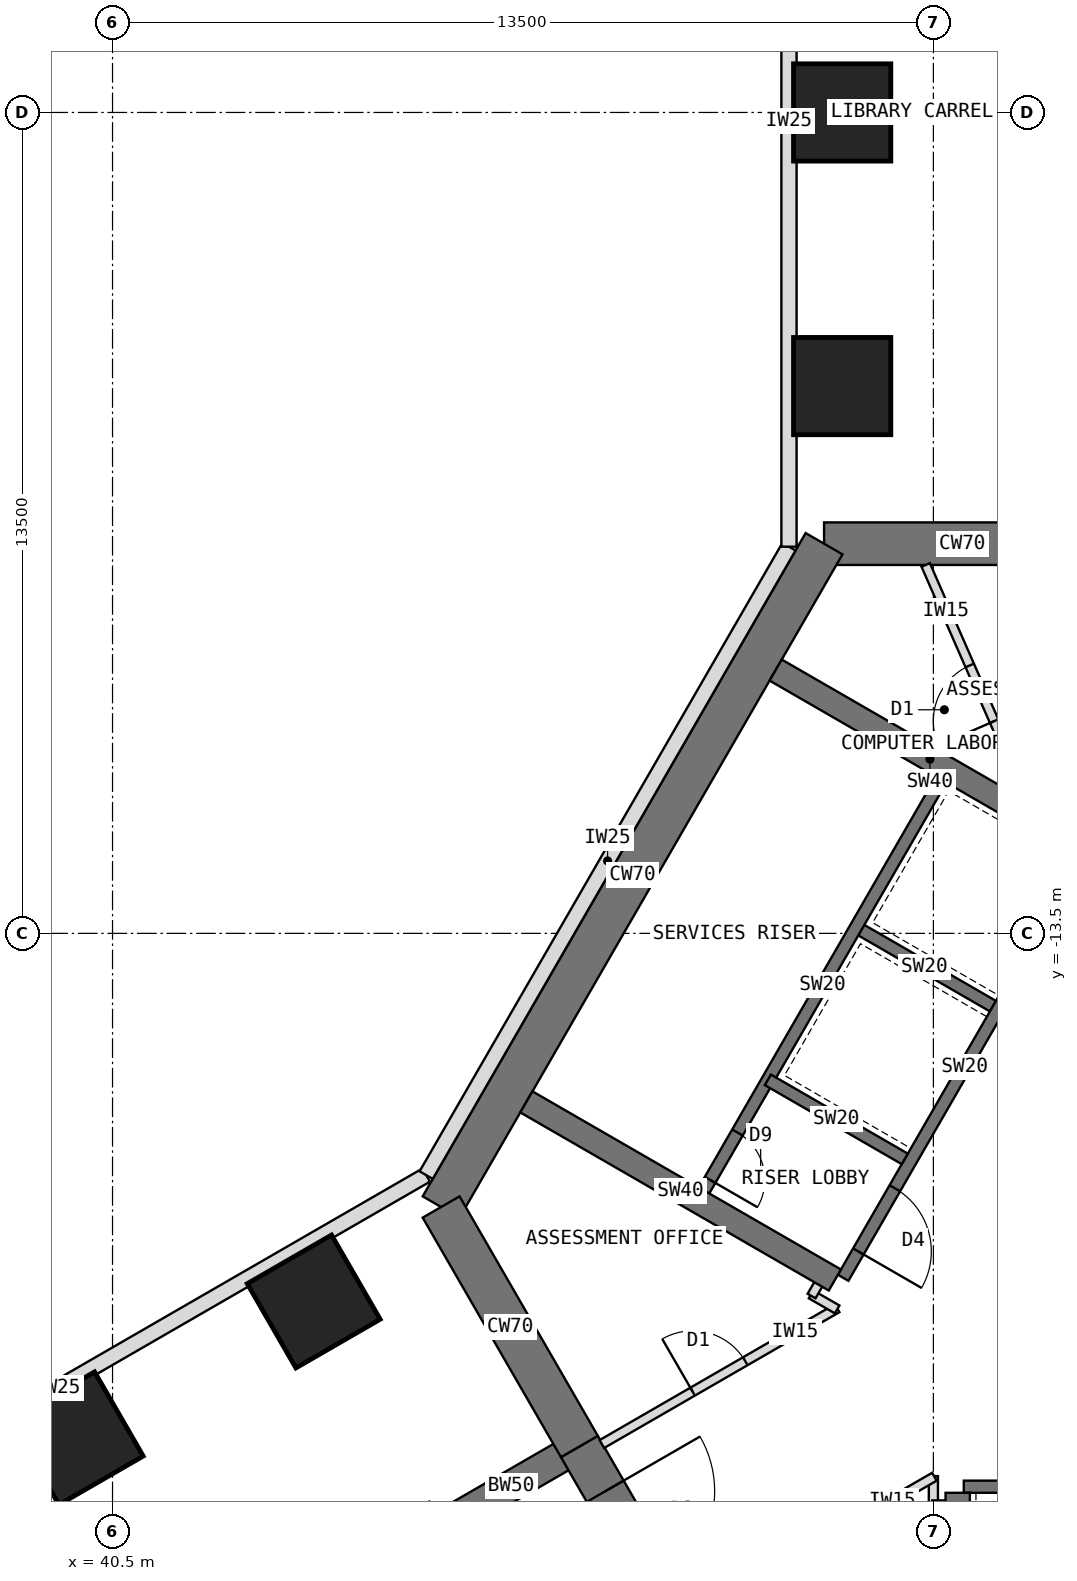
"""IFC4 building model, lengths in metres.
Left out: names, types, materials, properties, quantities, classifications, styles, units other than length and angle.
Written with IfcOpenShell. Run it as: python <this file> out.ifc"""

import sys

from ifc_helpers import new_model, si_unit, direction, frame, frame_2d, origin, origin_2d, place, context, subcontext, project, spatial, rectangle, extrude, element, fill, save


model = new_model("IFC4")
c1 = context("Model", 3, precision=1e-05, world=origin(), true_north=direction((0.0, 1.0)))
c2 = subcontext(c1, "Body", "Model", "MODEL_VIEW")
j1 = project(units=[si_unit("LENGTHUNIT", "METRE"), si_unit("PLANEANGLEUNIT", "RADIAN")], contexts=[c1])
p1 = place(None, origin())
s1 = spatial("IfcSite", under=j1, at=p1, CompositionType="ELEMENT")
p2 = place(p1, origin())
s2 = spatial("IfcBuilding", under=s1, at=p2, CompositionType="ELEMENT")
p3 = place(p2, frame((0.0, 0.0, 10.5)))
s3 = spatial("IfcBuildingStorey", under=s2, at=p3, CompositionType="ELEMENT", Elevation=10.5)
for number, where, z_axis, x_axis in (
    (1, (40.5, -13.5, 0.0), (0.0, 0.0, 1.0), (1.0, 0.0, 0.0)),
    (2, (40.5, 0.0, 0.0), (0.0, 0.0, 1.0), (1.0, 0.0, 0.0)),
):
    element("IfcColumn", number, at=place(p3, frame(where, z_axis=z_axis, x_axis=x_axis)), inside=s3, PredefinedType="COLUMN", context=c2, shape_type="SweptSolid", body=[
        extrude(rectangle(XDim=1.5, YDim=1.5, at=origin_2d()), origin(), (0.0, 0.0, 1.0), 5.0),
    ])
p4 = place(p3, frame((56.75, -7.092, 0.0), z_axis=(0.0, 0.0, 1.0), x_axis=(-1.0, 0.0, 0.0)))
e3 = element("IfcWall", 3, at=p4, inside=s3, PredefinedType="SHEAR", context=c2, shape_type="SweptSolid", body=[
    extrude(rectangle(XDim=4.548, YDim=0.7, at=frame_2d((2.274, 0.0))), origin(), (0.0, 0.0, 1.0), 5.0),
])
p5 = place(p3, frame((52.202, -7.092, 0.0), z_axis=(0.0, 0.0, 1.0), x_axis=(-0.500005998175, -0.866021940709, 0.0)))
e4 = element("IfcWall", 4, at=p5, inside=s3, PredefinedType="SHEAR", context=c2, shape_type="SweptSolid", body=[
    extrude(rectangle(XDim=12.596, YDim=0.7, at=frame_2d((6.298, 0.0))), origin(), (0.0, 0.0, 1.0), 5.0),
])
p6 = place(p3, frame((45.904, -18.0, 0.0), z_axis=(0.0, 0.0, 1.0), x_axis=(0.500024481964, -0.866011268655, 0.0)))
e5 = element("IfcWall", 5, at=p6, inside=s3, PredefinedType="SHEAR", context=c2, shape_type="SweptSolid", body=[
    extrude(rectangle(XDim=4.548, YDim=0.7, at=frame_2d((2.274, 0.0))), origin(), (0.0, 0.0, 1.0), 5.0),
])
p7 = place(p3, frame((48.178, -21.939, 0.0), z_axis=(0.0, 0.0, 1.0), x_axis=(0.500010275428, -0.866019471182, 0.0)))
e6 = element("IfcWall", 6, at=p7, inside=s3, PredefinedType="SHEAR", context=c2, shape_type="SweptSolid", body=[
    extrude(rectangle(XDim=3.5, YDim=0.7, at=frame_2d((1.75, 0.0))), origin(), (0.0, 0.0, 1.0), 5.0),
])
p8 = place(p7, frame((0.85, 0.0, 0.0)))
e7 = element("IfcOpeningElement", 7, at=p8, cuts=e6, PredefinedType="OPENING", context=c2, shape_type="SweptSolid", body=[
    extrude(rectangle(XDim=1.8, YDim=2.1, at=frame_2d((0.9, 1.05))), frame((0.0, 0.36, 0.0), z_axis=(0.0, -1.0, 0.0), x_axis=(1.0, 0.0, 0.0)), (0.0, 0.0, 1.0), 0.72),
])
p9 = place(p3, frame((48.178, -21.939, 0.0), z_axis=(0.0, 0.0, 1.0), x_axis=(-0.866072649678, -0.499918158782, 0.0)))
e8 = element("IfcWall", 8, at=p9, inside=s3, PredefinedType="SHEAR", context=c2, shape_type="SweptSolid", body=[
    extrude(rectangle(XDim=2.592, YDim=0.5, at=frame_2d((1.296, 0.0))), origin(), (0.0, 0.0, 1.0), 5.0),
])
for number, where, z_axis, x_axis in (
    (9, (52.5, -4.5, 0.0), (0.0, 0.0, 1.0), (1.0, 0.0, 0.0)),
    (10, (52.5, 0.0, 0.0), (0.0, 0.0, 1.0), (1.0, 0.0, 0.0)),
    (11, (43.809, -19.554, 0.0), (0.0, 0.0, 1.0), (0.866, 0.5, 0.0)),
    (12, (39.912, -21.804, 0.0), (0.0, 0.0, 1.0), (0.866, 0.5, 0.0)),
):
    element("IfcColumn", number, at=place(p3, frame(where, z_axis=z_axis, x_axis=x_axis)), inside=s3, PredefinedType="COLUMN", context=c2, shape_type="SweptSolid", body=[
        extrude(rectangle(XDim=1.6, YDim=1.6, at=origin_2d()), origin(), (0.0, 0.0, 1.0), 5.0),
    ])
p10 = place(p3, frame((56.516, -12.236, 0.0), z_axis=(0.0, 0.0, 1.0), x_axis=(-0.49999894854, -0.866026010844, 0.0)))
e13 = element("IfcWall", 13, at=p10, inside=s3, PredefinedType="SHEAR", context=c2, shape_type="SweptSolid", body=[
    extrude(rectangle(XDim=8.0, YDim=0.2, at=frame_2d((4.0, 0.0))), origin(), (0.0, 0.0, 1.0), 5.0),
])
p11 = place(p10, frame((6.3, 0.0, 0.0)))
e14 = element("IfcOpeningElement", 14, at=p11, cuts=e13, PredefinedType="OPENING", context=c2, shape_type="SweptSolid", body=[
    extrude(rectangle(XDim=1.2, YDim=2.1, at=frame_2d((0.6, 1.05))), frame((0.0, 0.11, 0.0), z_axis=(0.0, -1.0, 0.0), x_axis=(1.0, 0.0, 0.0)), (0.0, 0.0, 1.0), 0.22),
])
for number, where, z_axis, x_axis in (
    (15, (54.98, -14.697, 0.0), (0.0, 0.0, 1.0), (-0.866, 0.5, 0.0)),
    (16, (53.53, -17.209, 0.0), (0.0, 0.0, 1.0), (-0.866, 0.5, 0.0)),
):
    element("IfcWall", number, at=place(p3, frame(where, z_axis=z_axis, x_axis=x_axis)), inside=s3, PredefinedType="SHEAR", context=c2, shape_type="SweptSolid", body=[
        extrude(rectangle(XDim=2.6, YDim=0.2, at=frame_2d((1.3, 0.0))), origin(), (0.0, 0.0, 1.0), 5.0),
    ])
p12 = place(p3, frame((54.178, -10.886, 0.0), z_axis=(0.0, 0.0, 1.0), x_axis=(-0.49999894854, -0.866026010844, 0.0)))
e17 = element("IfcWall", 17, at=p12, inside=s3, PredefinedType="SHEAR", context=c2, shape_type="SweptSolid", body=[
    extrude(rectangle(XDim=8.0, YDim=0.2, at=frame_2d((4.0, 0.0))), origin(), (0.0, 0.0, 1.0), 5.0),
])
p13 = place(p12, frame((6.8, 0.0, 0.0)))
e18 = element("IfcOpeningElement", 18, at=p13, cuts=e17, PredefinedType="OPENING", context=c2, shape_type="SweptSolid", body=[
    extrude(rectangle(XDim=0.9, YDim=2.1, at=frame_2d((0.45, 1.05))), frame((0.0, 0.11, 0.0), z_axis=(0.0, -1.0, 0.0), x_axis=(1.0, 0.0, 0.0)), (0.0, 0.0, 1.0), 0.22),
])
for number, where, z_axis, x_axis in (
    (19, (52.38, -19.201, 0.0), (0.0, 0.0, 1.0), (-0.866, 0.5, 0.0)),
    (20, (56.48, -12.099, 0.0), (0.0, 0.0, 1.0), (-0.866, 0.5, 0.0)),
):
    element("IfcWall", number, at=place(p3, frame(where, z_axis=z_axis, x_axis=x_axis)), inside=s3, PredefinedType="SHEAR", context=c2, shape_type="SweptSolid", body=[
        extrude(rectangle(XDim=5.858, YDim=0.4, at=frame_2d((2.929, 0.0))), origin(), (0.0, 0.0, 1.0), 5.0),
    ])
p14 = place(p3, frame((54.5, -22.6, 0.0), z_axis=(0.0, 0.0, 1.0), x_axis=(1.0, 0.0, 0.0)))
e21 = element("IfcWall", 21, at=p14, inside=s3, PredefinedType="SHEAR", context=c2, shape_type="SweptSolid", body=[
    extrude(rectangle(XDim=8.0, YDim=0.2, at=frame_2d((4.0, 0.0))), origin(), (0.0, 0.0, 1.0), 5.0),
])
p15 = place(p14, frame((6.3, 0.0, 0.0)))
e22 = element("IfcOpeningElement", 22, at=p15, cuts=e21, PredefinedType="OPENING", context=c2, shape_type="SweptSolid", body=[
    extrude(rectangle(XDim=1.2, YDim=2.1, at=frame_2d((0.6, 1.05))), frame((0.0, 0.11, 0.0), z_axis=(0.0, -1.0, 0.0), x_axis=(1.0, 0.0, 0.0)), (0.0, 0.0, 1.0), 0.22),
])
p16 = place(p14, frame((0.9, 0.0, 0.0)))
e23 = element("IfcOpeningElement", 23, at=p16, cuts=e21, PredefinedType="OPENING", context=c2, shape_type="SweptSolid", body=[
    extrude(rectangle(XDim=1.1, YDim=2.2, at=frame_2d((0.55, 1.1))), frame((0.0, 0.11, 0.0), z_axis=(0.0, -1.0, 0.0), x_axis=(1.0, 0.0, 0.0)), (0.0, 0.0, 1.0), 0.22),
])
p17 = place(p3, frame((54.4, -22.7, 0.0), z_axis=(0.0, 0.0, 1.0), x_axis=(0.0, -1.0, 0.0)))
e24 = element("IfcWall", 24, at=p17, inside=s3, PredefinedType="SHEAR", context=c2, shape_type="SweptSolid", body=[
    extrude(rectangle(XDim=5.858, YDim=0.4, at=frame_2d((2.929, 0.0))), origin(), (0.0, 0.0, 1.0), 5.0),
])
p18 = place(p3, frame((54.0, -22.92, 0.0), z_axis=(0.0, 0.0, 1.0), x_axis=(0.0, 1.0, 0.0)))
e25 = element("IfcWall", 25, at=p18, inside=s3, PredefinedType="PARTITIONING", context=c2, shape_type="SweptSolid", body=[
    extrude(rectangle(XDim=0.494, YDim=0.15, at=frame_2d((0.247, 0.0))), origin(), (0.0, 0.0, 1.0), 4.65),
])
p19 = place(p3, frame((54.017, -22.436, 0.0), z_axis=(0.0, 0.0, 1.0), x_axis=(-0.866015446554, -0.500017246033, 0.0)))
e26 = element("IfcWall", 26, at=p19, inside=s3, PredefinedType="PARTITIONING", context=c2, shape_type="SweptSolid", body=[
    extrude(rectangle(XDim=4.469, YDim=0.15, at=frame_2d((2.234, 0.0))), origin(), (0.0, 0.0, 1.0), 4.65),
])
p20 = place(p19, frame((1.744, 0.0, 0.0)))
e27 = element("IfcOpeningElement", 27, at=p20, cuts=e26, PredefinedType="OPENING", context=c2, shape_type="SweptSolid", body=[
    extrude(rectangle(XDim=1.0, YDim=2.1, at=frame_2d((0.5, 1.05))), frame((0.0, 0.085, 0.0), z_axis=(0.0, -1.0, 0.0), x_axis=(1.0, 0.0, 0.0)), (0.0, 0.0, 1.0), 0.17),
])
p21 = place(p3, frame((48.548, -21.898, 0.0), z_axis=(0.0, 0.0, 1.0), x_axis=(0.866025445582, 0.499999927604, 0.0)))
e28 = element("IfcWall", 28, at=p21, inside=s3, PredefinedType="PARTITIONING", context=c2, shape_type="SweptSolid", body=[
    extrude(rectangle(XDim=4.468, YDim=0.15, at=frame_2d((2.234, 0.0))), origin(), (0.0, 0.0, 1.0), 4.65),
])
p22 = place(p21, frame((1.724, 0.0, 0.0)))
e29 = element("IfcOpeningElement", 29, at=p22, cuts=e28, PredefinedType="OPENING", context=c2, shape_type="SweptSolid", body=[
    extrude(rectangle(XDim=1.0, YDim=2.1, at=frame_2d((0.5, 1.05))), frame((0.0, 0.085, 0.0), z_axis=(0.0, -1.0, 0.0), x_axis=(1.0, 0.0, 0.0)), (0.0, 0.0, 1.0), 0.17),
])
p23 = place(p3, frame((52.417, -19.684, 0.0), z_axis=(0.0, 0.0, 1.0), x_axis=(-0.865831790172, 0.50033519877, 0.0)))
e30 = element("IfcWall", 30, at=p23, inside=s3, PredefinedType="PARTITIONING", context=c2, shape_type="SweptSolid", body=[
    extrude(rectangle(XDim=0.494, YDim=0.15, at=frame_2d((0.247, 0.0))), origin(), (0.0, 0.0, 1.0), 4.65),
])
for number, where, z_axis, x_axis in (
    (31, (51.997, -19.464, 0.0), (0.0, 0.0, 1.0), (0.5, 0.866, 0.0)),
    (32, (54.41, -22.9, 0.0), (0.0, 0.0, 1.0), (-1.0, 0.0, 0.0)),
):
    element("IfcWall", number, at=place(p3, frame(where, z_axis=z_axis, x_axis=x_axis)), inside=s3, PredefinedType="PARTITIONING", context=c2, shape_type="SweptSolid", body=[
        extrude(rectangle(XDim=0.43, YDim=0.15, at=frame_2d((0.215, 0.0))), origin(), (0.0, 0.0, 1.0), 4.65),
    ])
p24 = place(p3, frame((55.723, -11.662, 0.0), z_axis=(0.0, 0.0, 1.0), x_axis=(-0.40133016735, 0.915933456521, 0.0)))
e33 = element("IfcWall", 33, at=p24, inside=s3, PredefinedType="PARTITIONING", context=c2, shape_type="SweptSolid", body=[
    extrude(rectangle(XDim=4.608, YDim=0.15, at=frame_2d((2.304, 0.0))), origin(), (0.0, 0.0, 1.0), 4.65),
])
p25 = place(p24, frame((1.804, 0.0, 0.0)))
e34 = element("IfcOpeningElement", 34, at=p25, cuts=e33, PredefinedType="OPENING", context=c2, shape_type="SweptSolid", body=[
    extrude(rectangle(XDim=1.0, YDim=2.1, at=frame_2d((0.5, 1.05))), frame((0.0, 0.085, 0.0), z_axis=(0.0, -1.0, 0.0), x_axis=(1.0, 0.0, 0.0)), (0.0, 0.0, 1.0), 0.17),
])
p26 = place(p3, frame((40.5, -20.252, 0.0), z_axis=(0.0, 0.0, 1.0), x_axis=(0.0, 1.0, 0.0)))
e35 = element("IfcWall", 35, at=p26, inside=s3, PredefinedType="PARTITIONING", context=c2, shape_type="SweptSolid", body=[
    extrude(rectangle(XDim=6.752, YDim=0.2, at=frame_2d((3.376, 0.0))), origin(), (0.0, 0.0, 1.0), 4.65),
])
p27 = place(p26, frame((2.476, 0.0, 0.0)))
e36 = element("IfcOpeningElement", 36, at=p27, cuts=e35, PredefinedType="OPENING", context=c2, shape_type="SweptSolid", body=[
    extrude(rectangle(XDim=1.8, YDim=2.4, at=frame_2d((0.9, 1.2))), frame((0.0, 0.11, 0.0), z_axis=(0.0, -1.0, 0.0), x_axis=(1.0, 0.0, 0.0)), (0.0, 0.0, 1.0), 0.22),
])
p28 = place(p3, frame((27.0, -13.5, 0.0), z_axis=(0.0, 0.0, 1.0), x_axis=(1.0, 0.0, 0.0)))
e37 = element("IfcWall", 37, at=p28, inside=s3, PredefinedType="PARTITIONING", context=c2, shape_type="SweptSolid", body=[
    extrude(rectangle(XDim=13.5, YDim=0.2, at=frame_2d((6.75, 0.0))), origin(), (0.0, 0.0, 1.0), 3.25),
])
p29 = place(p3, frame((40.5, -13.5, 0.0), z_axis=(0.0, 0.0, 1.0), x_axis=(0.0, 1.0, 0.0)))
e38 = element("IfcWall", 38, at=p29, inside=s3, PredefinedType="PARTITIONING", context=c2, shape_type="SweptSolid", body=[
    extrude(rectangle(XDim=13.5, YDim=0.2, at=frame_2d((6.75, 0.0))), origin(), (0.0, 0.0, 1.0), 3.25),
])
p30 = place(p29, frame((5.85, 0.0, 0.0)))
e39 = element("IfcOpeningElement", 39, at=p30, cuts=e38, PredefinedType="OPENING", context=c2, shape_type="SweptSolid", body=[
    extrude(rectangle(XDim=1.8, YDim=2.4, at=frame_2d((0.9, 1.2))), frame((0.0, 0.11, 0.0), z_axis=(0.0, -1.0, 0.0), x_axis=(1.0, 0.0, 0.0)), (0.0, 0.0, 1.0), 0.22),
])
p31 = place(p3, frame((40.5, 0.0, 0.0), z_axis=(0.0, 0.0, 1.0), x_axis=(0.0, 1.0, 0.0)))
e40 = element("IfcWall", 40, at=p31, inside=s3, PredefinedType="PARTITIONING", context=c2, shape_type="SweptSolid", body=[
    extrude(rectangle(XDim=13.5, YDim=0.2, at=frame_2d((6.75, 0.0))), origin(), (0.0, 0.0, 1.0), 3.25),
])
p32 = place(p31, frame((5.85, 0.0, 0.0)))
e41 = element("IfcOpeningElement", 41, at=p32, cuts=e40, PredefinedType="OPENING", context=c2, shape_type="SweptSolid", body=[
    extrude(rectangle(XDim=1.8, YDim=2.4, at=frame_2d((0.9, 1.2))), frame((0.0, 0.11, 0.0), z_axis=(0.0, -1.0, 0.0), x_axis=(1.0, 0.0, 0.0)), (0.0, 0.0, 1.0), 0.22),
])
p33 = place(p3, frame((40.5, 0.0, 0.0), z_axis=(0.0, 0.0, 1.0), x_axis=(1.0, 0.0, 0.0)))
e42 = element("IfcWall", 42, at=p33, inside=s3, PredefinedType="PARTITIONING", context=c2, shape_type="SweptSolid", body=[
    extrude(rectangle(XDim=10.95, YDim=0.2, at=frame_2d((5.475, 0.0))), origin(), (0.0, 0.0, 1.0), 4.65),
])
p34 = place(p33, frame((4.575, 0.0, 0.0)))
e43 = element("IfcOpeningElement", 43, at=p34, cuts=e42, PredefinedType="OPENING", context=c2, shape_type="SweptSolid", body=[
    extrude(rectangle(XDim=1.8, YDim=2.4, at=frame_2d((0.9, 1.2))), frame((0.0, 0.11, 0.0), z_axis=(0.0, -1.0, 0.0), x_axis=(1.0, 0.0, 0.0)), (0.0, 0.0, 1.0), 0.22),
])
p35 = place(p3, frame((33.52, -24.484, 0.0), z_axis=(0.0, 0.0, 1.0), x_axis=(0.866027500821, 0.499996367808, 0.0)))
e44 = element("IfcWall", 44, at=p35, inside=s3, PredefinedType="STANDARD", context=c2, shape_type="SweptSolid", body=[
    extrude(rectangle(XDim=14.016, YDim=0.25, at=frame_2d((7.008, 0.0))), origin(), (0.0, 0.0, 1.0), 4.65),
])
p36 = place(p3, frame((45.658, -17.476, 0.0), z_axis=(0.0, 0.0, 1.0), x_axis=(0.499996365031, 0.866027502425, 0.0)))
e45 = element("IfcWall", 45, at=p36, inside=s3, PredefinedType="STANDARD", context=c2, shape_type="SweptSolid", body=[
    extrude(rectangle(XDim=11.933, YDim=0.25, at=frame_2d((5.967, 0.0))), origin(), (0.0, 0.0, 1.0), 4.65),
])
p37 = place(p3, frame((51.625, -7.141, 0.0), z_axis=(0.0, 0.0, 1.0), x_axis=(0.0, 1.0, 0.0)))
e46 = element("IfcWall", 46, at=p37, inside=s3, PredefinedType="STANDARD", context=c2, shape_type="SweptSolid", body=[
    extrude(rectangle(XDim=14.016, YDim=0.25, at=frame_2d((7.008, 0.0))), origin(), (0.0, 0.0, 1.0), 4.65),
])
p38 = place(p11, origin())
e47 = element("IfcDoor", 47, at=p38, inside=s3, OperationType="SINGLE_SWING_RIGHT", PredefinedType="DOOR", context=c2, shape_type="SweptSolid", body=[
    extrude(rectangle(XDim=1.2, YDim=2.1, at=frame_2d((0.6, 1.05))), frame((0.0, 0.025, 0.0), z_axis=(0.0, -1.0, 0.0), x_axis=(1.0, 0.0, 0.0)), (0.0, 0.0, 1.0), 0.05),
])
fill(e14, e47)
p39 = place(p13, origin())
e48 = element("IfcDoor", 48, at=p39, inside=s3, OperationType="SINGLE_SWING_RIGHT", PredefinedType="DOOR", context=c2, shape_type="SweptSolid", body=[
    extrude(rectangle(XDim=0.9, YDim=2.1, at=frame_2d((0.45, 1.05))), frame((0.0, 0.025, 0.0), z_axis=(0.0, -1.0, 0.0), x_axis=(1.0, 0.0, 0.0)), (0.0, 0.0, 1.0), 0.05),
])
fill(e18, e48)
p40 = place(p8, origin())
e49 = element("IfcDoor", 49, at=p40, inside=s3, OperationType="DOUBLE_DOOR_DOUBLE_SWING", PredefinedType="DOOR", context=c2, shape_type="SweptSolid", body=[
    extrude(rectangle(XDim=1.72, YDim=2.06, at=frame_2d((0.9, 1.03))), frame((0.0, 0.025, 0.0), z_axis=(0.0, -1.0, 0.0), x_axis=(1.0, 0.0, 0.0)), (0.0, 0.0, 1.0), 0.05),
    extrude(rectangle(XDim=0.04, YDim=2.1, at=frame_2d((0.02, 1.05))), frame((0.0, 0.35, 0.0), z_axis=(0.0, -1.0, 0.0), x_axis=(1.0, 0.0, 0.0)), (0.0, 0.0, 1.0), 0.699),
    extrude(rectangle(XDim=0.04, YDim=2.1, at=frame_2d((1.78, 1.05))), frame((0.0, 0.35, 0.0), z_axis=(0.0, -1.0, 0.0), x_axis=(1.0, 0.0, 0.0)), (0.0, 0.0, 1.0), 0.699),
    extrude(rectangle(XDim=1.72, YDim=0.04, at=frame_2d((0.9, 2.08))), frame((0.0, 0.35, 0.0), z_axis=(0.0, -1.0, 0.0), x_axis=(1.0, 0.0, 0.0)), (0.0, 0.0, 1.0), 0.699),
])
fill(e7, e49)
p41 = place(p22, origin())
e50 = element("IfcDoor", 50, at=p41, inside=s3, OperationType="SINGLE_SWING_LEFT", PredefinedType="DOOR", context=c2, shape_type="SweptSolid", body=[
    extrude(rectangle(XDim=1.0, YDim=2.1, at=frame_2d((0.5, 1.05))), frame((0.0, 0.025, 0.0), z_axis=(0.0, -1.0, 0.0), x_axis=(1.0, 0.0, 0.0)), (0.0, 0.0, 1.0), 0.05),
])
fill(e29, e50)
p42 = place(p25, origin())
e51 = element("IfcDoor", 51, at=p42, inside=s3, OperationType="SINGLE_SWING_LEFT", PredefinedType="DOOR", context=c2, shape_type="SweptSolid", body=[
    extrude(rectangle(XDim=1.0, YDim=2.1, at=frame_2d((0.5, 1.05))), frame((0.0, 0.025, 0.0), z_axis=(0.0, -1.0, 0.0), x_axis=(1.0, 0.0, 0.0)), (0.0, 0.0, 1.0), 0.05),
])
fill(e34, e51)
p43 = place(p34, origin())
e52 = element("IfcDoor", 52, at=p43, inside=s3, OperationType="DOUBLE_DOOR_DOUBLE_SWING", PredefinedType="DOOR", context=c2, shape_type="SweptSolid", body=[
    extrude(rectangle(XDim=1.8, YDim=2.4, at=frame_2d((0.9, 1.2))), frame((0.0, 0.025, 0.0), z_axis=(0.0, -1.0, 0.0), x_axis=(1.0, 0.0, 0.0)), (0.0, 0.0, 1.0), 0.05),
])
fill(e43, e52)
p44 = place(p27, origin())
e53 = element("IfcDoor", 53, at=p44, inside=s3, OperationType="DOUBLE_DOOR_DOUBLE_SWING", PredefinedType="DOOR", context=c2, shape_type="SweptSolid", body=[
    extrude(rectangle(XDim=1.8, YDim=2.4, at=frame_2d((0.9, 1.2))), frame((0.0, 0.025, 0.0), z_axis=(0.0, -1.0, 0.0), x_axis=(1.0, 0.0, 0.0)), (0.0, 0.0, 1.0), 0.05),
])
fill(e36, e53)
p45 = place(p30, origin())
e54 = element("IfcDoor", 54, at=p45, inside=s3, OperationType="DOUBLE_DOOR_DOUBLE_SWING", PredefinedType="DOOR", context=c2, shape_type="SweptSolid", body=[
    extrude(rectangle(XDim=1.8, YDim=2.4, at=frame_2d((0.9, 1.2))), frame((0.0, 0.025, 0.0), z_axis=(0.0, -1.0, 0.0), x_axis=(1.0, 0.0, 0.0)), (0.0, 0.0, 1.0), 0.05),
])
fill(e39, e54)
save(model, sys.argv[1])
